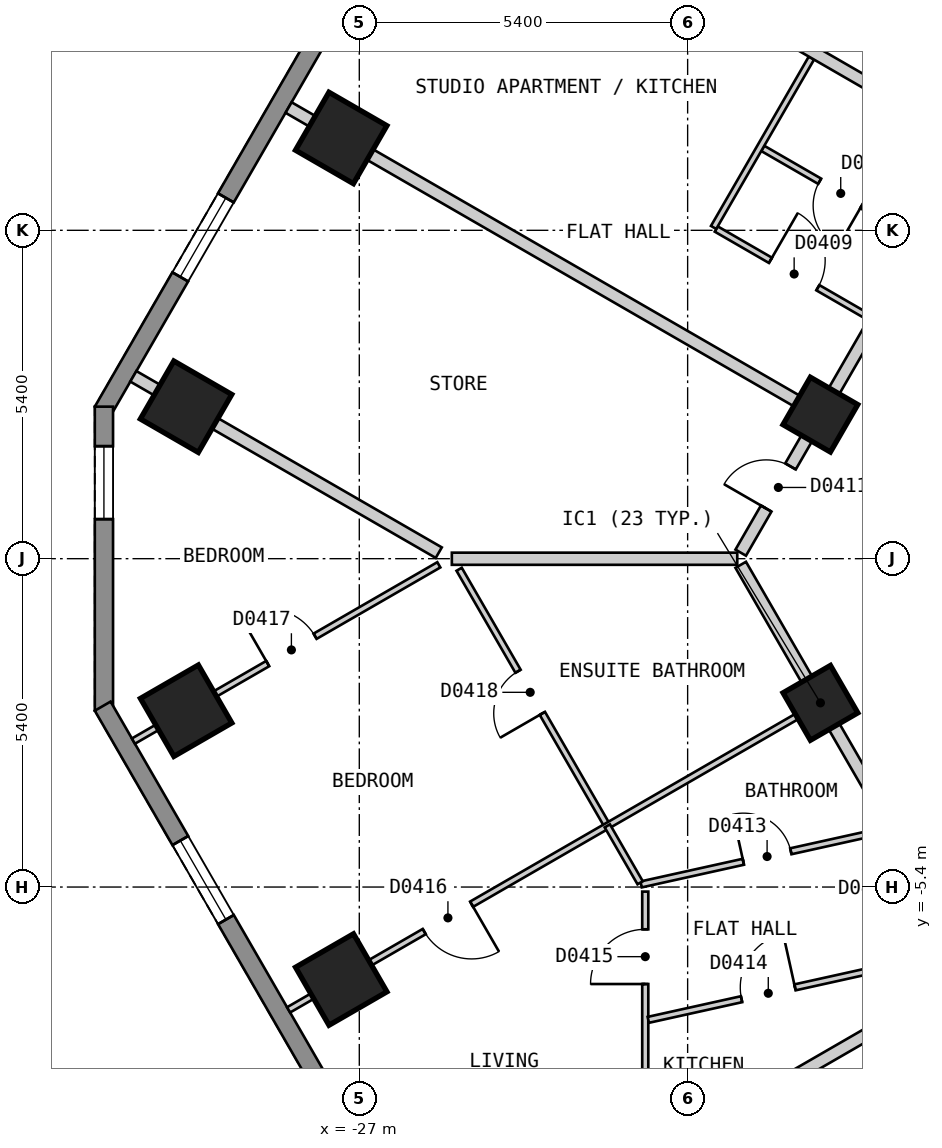
"""IFC4 building model, lengths in metres.
Left out: names, types, materials, properties, quantities, classifications, styles, units other than length and angle.
Written with IfcOpenShell. Run it as: python <this file> out.ifc"""

import sys

from ifc_helpers import new_model, si_unit, direction, frame, frame_2d, origin, origin_2d, place, context, subcontext, project, spatial, polyline, rectangle, outline, extrude, element, fill, save


model = new_model("IFC4")
c1 = context("Model", 3, precision=1e-05, world=origin(), true_north=direction((0.0, 1.0)))
c2 = subcontext(c1, "Body", "Model", "MODEL_VIEW")
j1 = project(units=[si_unit("LENGTHUNIT", "METRE"), si_unit("PLANEANGLEUNIT", "RADIAN")], contexts=[c1])
p1 = place(None, origin())
s1 = spatial("IfcSite", under=j1, at=p1, CompositionType="ELEMENT")
p2 = place(p1, origin())
s2 = spatial("IfcBuilding", under=s1, at=p2, CompositionType="ELEMENT")
p3 = place(p2, frame((0.0, 0.0, 26.4)))
s3 = spatial("IfcBuildingStorey", under=s2, at=p3, CompositionType="ELEMENT", Elevation=26.4)
for number, where, z_axis, x_axis in (
    (1, (-27.298, 6.919, 0.0), (0.0, 0.0, 1.0), (-0.5, -0.866, 0.0)),
    (2, (-29.849, 2.499, 0.0), (0.0, 0.0, 1.0), (-0.5, -0.866, 0.0)),
    (3, (-29.848, -2.5, 0.0), (0.0, 0.0, 1.0), (0.5, -0.866, 0.0)),
    (4, (-27.297, -6.921, 0.0), (0.0, 0.0, 1.0), (0.5, -0.866, 0.0)),
):
    element("IfcColumn", number, at=place(p3, frame(where, z_axis=z_axis, x_axis=x_axis)), inside=s3, PredefinedType="COLUMN", context=c2, shape_type="SweptSolid", body=[
        extrude(rectangle(XDim=1.1, YDim=1.1, at=origin_2d()), origin(), (0.0, 0.0, 1.0), 3.0),
    ])
for number, where, z_axis, x_axis in (
    (5, (-19.416, -2.371, 0.0), (0.0, 0.0, 1.0), (0.5, -0.866, 0.0)),
    (6, (-19.417, 2.369, 0.0), (0.0, 0.0, 1.0), (-0.5, -0.866, 0.0)),
):
    element("IfcColumn", number, at=place(p3, frame(where, z_axis=z_axis, x_axis=x_axis)), inside=s3, PredefinedType="COLUMN", context=c2, shape_type="SweptSolid", body=[
        extrude(rectangle(XDim=0.9, YDim=0.9, at=origin_2d()), origin(), (0.0, 0.0, 1.0), 3.0),
    ])
p4 = place(p3, frame((-17.71, 25.825, 0.0), z_axis=(0.0, 0.0, 1.0), x_axis=(-0.500001938803, -0.866024284413, 0.0)))
e7 = element("IfcWall", 7, at=p4, inside=s3, PredefinedType="SOLIDWALL", context=c2, shape_type="SweptSolid", body=[
    extrude(outline(polyline([(0.0, -0.15), (27.02, -0.15), (26.94, 0.15), (0.08, 0.15), (0.0, -0.15)])), origin(), (0.0, 0.0, 1.0), 2.7),
])
p5 = place(p4, frame((2.553, 0.0, 0.15)))
e8 = element("IfcOpeningElement", 8, at=p5, cuts=e7, PredefinedType="OPENING", context=c2, shape_type="SweptSolid", body=[
    extrude(rectangle(XDim=1.5, YDim=2.1, at=frame_2d((0.75, 1.05))), frame((0.0, 0.16, 0.0), z_axis=(0.0, -1.0, 0.0), x_axis=(1.0, 0.0, 0.0)), (0.0, 0.0, 1.0), 0.32),
])
p6 = place(p4, frame((7.658, 0.0, 0.15)))
e9 = element("IfcOpeningElement", 9, at=p6, cuts=e7, PredefinedType="OPENING", context=c2, shape_type="SweptSolid", body=[
    extrude(rectangle(XDim=1.5, YDim=2.1, at=frame_2d((0.75, 1.05))), frame((0.0, 0.16, 0.0), z_axis=(0.0, -1.0, 0.0), x_axis=(1.0, 0.0, 0.0)), (0.0, 0.0, 1.0), 0.32),
])
p7 = place(p4, frame((12.761, 0.0, 0.15)))
e10 = element("IfcOpeningElement", 10, at=p7, cuts=e7, PredefinedType="OPENING", context=c2, shape_type="SweptSolid", body=[
    extrude(rectangle(XDim=1.5, YDim=2.1, at=frame_2d((0.75, 1.05))), frame((0.0, 0.16, 0.0), z_axis=(0.0, -1.0, 0.0), x_axis=(1.0, 0.0, 0.0)), (0.0, 0.0, 1.0), 0.32),
])
p8 = place(p4, frame((17.865, 0.0, 0.15)))
e11 = element("IfcOpeningElement", 11, at=p8, cuts=e7, PredefinedType="OPENING", context=c2, shape_type="SweptSolid", body=[
    extrude(rectangle(XDim=1.5, YDim=2.1, at=frame_2d((0.75, 1.05))), frame((0.0, 0.16, 0.0), z_axis=(0.0, -1.0, 0.0), x_axis=(1.0, 0.0, 0.0)), (0.0, 0.0, 1.0), 0.32),
])
p9 = place(p4, frame((22.969, 0.0, 0.15)))
e12 = element("IfcOpeningElement", 12, at=p9, cuts=e7, PredefinedType="OPENING", context=c2, shape_type="SweptSolid", body=[
    extrude(rectangle(XDim=1.5, YDim=2.1, at=frame_2d((0.75, 1.05))), frame((0.0, 0.16, 0.0), z_axis=(0.0, -1.0, 0.0), x_axis=(1.0, 0.0, 0.0)), (0.0, 0.0, 1.0), 0.32),
])
p10 = place(p3, frame((-31.2, 2.5, 0.0), z_axis=(0.0, 0.0, 1.0), x_axis=(0.0, -1.0, 0.0)))
e13 = element("IfcWall", 13, at=p10, inside=s3, PredefinedType="SOLIDWALL", context=c2, shape_type="SweptSolid", body=[
    extrude(outline(polyline([(0.0, -0.15), (5.0, -0.15), (4.92, 0.15), (0.08, 0.15), (0.0, -0.15)])), origin(), (0.0, 0.0, 1.0), 2.7),
])
p11 = place(p10, frame((0.65, 0.0, 0.15)))
e14 = element("IfcOpeningElement", 14, at=p11, cuts=e13, PredefinedType="OPENING", context=c2, shape_type="SweptSolid", body=[
    extrude(rectangle(XDim=1.2, YDim=2.1, at=frame_2d((0.6, 1.05))), frame((0.0, 0.16, 0.0), z_axis=(0.0, -1.0, 0.0), x_axis=(1.0, 0.0, 0.0)), (0.0, 0.0, 1.0), 0.32),
])
p12 = place(p3, frame((-31.22, -2.425, 0.0), z_axis=(0.0, 0.0, 1.0), x_axis=(0.500001938803, -0.866024284413, 0.0)))
e15 = element("IfcWall", 15, at=p12, inside=s3, PredefinedType="SOLIDWALL", context=c2, shape_type="SweptSolid", body=[
    extrude(outline(polyline([(0.0, -0.15), (27.02, -0.15), (26.94, 0.15), (0.08, 0.15), (0.0, -0.15)])), origin(), (0.0, 0.0, 1.0), 2.7),
])
p13 = place(p12, frame((2.553, 0.0, 0.15)))
e16 = element("IfcOpeningElement", 16, at=p13, cuts=e15, PredefinedType="OPENING", context=c2, shape_type="SweptSolid", body=[
    extrude(rectangle(XDim=1.5, YDim=2.1, at=frame_2d((0.75, 1.05))), frame((0.0, 0.16, 0.0), z_axis=(0.0, -1.0, 0.0), x_axis=(1.0, 0.0, 0.0)), (0.0, 0.0, 1.0), 0.32),
])
p14 = place(p12, frame((7.657, 0.0, 0.15)))
e17 = element("IfcOpeningElement", 17, at=p14, cuts=e15, PredefinedType="OPENING", context=c2, shape_type="SweptSolid", body=[
    extrude(rectangle(XDim=1.5, YDim=2.1, at=frame_2d((0.75, 1.05))), frame((0.0, 0.16, 0.0), z_axis=(0.0, -1.0, 0.0), x_axis=(1.0, 0.0, 0.0)), (0.0, 0.0, 1.0), 0.32),
])
p15 = place(p12, frame((12.761, 0.0, 0.15)))
e18 = element("IfcOpeningElement", 18, at=p15, cuts=e15, PredefinedType="OPENING", context=c2, shape_type="SweptSolid", body=[
    extrude(rectangle(XDim=1.5, YDim=2.1, at=frame_2d((0.75, 1.05))), frame((0.0, 0.16, 0.0), z_axis=(0.0, -1.0, 0.0), x_axis=(1.0, 0.0, 0.0)), (0.0, 0.0, 1.0), 0.32),
])
p16 = place(p12, frame((17.865, 0.0, 0.15)))
e19 = element("IfcOpeningElement", 19, at=p16, cuts=e15, PredefinedType="OPENING", context=c2, shape_type="SweptSolid", body=[
    extrude(rectangle(XDim=1.5, YDim=2.1, at=frame_2d((0.75, 1.05))), frame((0.0, 0.16, 0.0), z_axis=(0.0, -1.0, 0.0), x_axis=(1.0, 0.0, 0.0)), (0.0, 0.0, 1.0), 0.32),
])
p17 = place(p12, frame((22.969, 0.0, 0.15)))
e20 = element("IfcOpeningElement", 20, at=p17, cuts=e15, PredefinedType="OPENING", context=c2, shape_type="SweptSolid", body=[
    extrude(rectangle(XDim=1.5, YDim=2.1, at=frame_2d((0.75, 1.05))), frame((0.0, 0.16, 0.0), z_axis=(0.0, -1.0, 0.0), x_axis=(1.0, 0.0, 0.0)), (0.0, 0.0, 1.0), 0.32),
])
p18 = place(p3, frame((-20.727, -0.101, 0.0), z_axis=(0.0, 0.0, 1.0), x_axis=(0.500049702773, -0.865996705973, 0.0)))
e21 = element("IfcWall", 21, at=p18, inside=s3, PredefinedType="PARTITIONING", context=c2, shape_type="SweptSolid", body=[
    extrude(rectangle(XDim=7.211, YDim=0.2, at=frame_2d((3.605, 0.0))), origin(), (0.0, 0.0, 1.0), 2.7),
])
p19 = place(p18, frame((5.654, 0.0, 0.0)))
e22 = element("IfcOpeningElement", 22, at=p19, cuts=e21, PredefinedType="OPENING", context=c2, shape_type="SweptSolid", body=[
    extrude(rectangle(XDim=1.0, YDim=2.1, at=frame_2d((0.5, 1.05))), frame((0.0, 0.11, 0.0), z_axis=(0.0, -1.0, 0.0), x_axis=(1.0, 0.0, 0.0)), (0.0, 0.0, 1.0), 0.22),
])
p20 = place(p3, frame((-20.727, 0.099, 0.0), z_axis=(0.0, 0.0, 1.0), x_axis=(0.499993204491, 0.866029327138, 0.0)))
e23 = element("IfcWall", 23, at=p20, inside=s3, PredefinedType="PARTITIONING", context=c2, shape_type="SweptSolid", body=[
    extrude(rectangle(XDim=20.554, YDim=0.2, at=frame_2d((10.277, 0.0))), origin(), (0.0, 0.0, 1.0), 2.7),
])
p21 = place(p20, frame((18.916, 0.0, 0.0)))
e24 = element("IfcOpeningElement", 24, at=p21, cuts=e23, PredefinedType="OPENING", context=c2, shape_type="SweptSolid", body=[
    extrude(rectangle(XDim=0.8, YDim=2.1, at=frame_2d((0.4, 1.05))), frame((0.0, 0.11, 0.0), z_axis=(0.0, -1.0, 0.0), x_axis=(1.0, 0.0, 0.0)), (0.0, 0.0, 1.0), 0.22),
])
p22 = place(p20, frame((14.88, 0.0, 0.0)))
e25 = element("IfcOpeningElement", 25, at=p22, cuts=e23, PredefinedType="OPENING", context=c2, shape_type="SweptSolid", body=[
    extrude(rectangle(XDim=1.0, YDim=2.1, at=frame_2d((0.5, 1.05))), frame((0.0, 0.11, 0.0), z_axis=(0.0, -1.0, 0.0), x_axis=(1.0, 0.0, 0.0)), (0.0, 0.0, 1.0), 0.22),
])
p23 = place(p20, frame((9.776, 0.0, 0.0)))
e26 = element("IfcOpeningElement", 26, at=p23, cuts=e23, PredefinedType="OPENING", context=c2, shape_type="SweptSolid", body=[
    extrude(rectangle(XDim=1.0, YDim=2.1, at=frame_2d((0.5, 1.05))), frame((0.0, 0.11, 0.0), z_axis=(0.0, -1.0, 0.0), x_axis=(1.0, 0.0, 0.0)), (0.0, 0.0, 1.0), 0.22),
])
p24 = place(p20, frame((4.673, 0.0, 0.0)))
e27 = element("IfcOpeningElement", 27, at=p24, cuts=e23, PredefinedType="OPENING", context=c2, shape_type="SweptSolid", body=[
    extrude(rectangle(XDim=1.0, YDim=2.1, at=frame_2d((0.5, 1.05))), frame((0.0, 0.11, 0.0), z_axis=(0.0, -1.0, 0.0), x_axis=(1.0, 0.0, 0.0)), (0.0, 0.0, 1.0), 0.22),
])
p25 = place(p20, frame((0.838, 0.0, 0.0)))
e28 = element("IfcOpeningElement", 28, at=p25, cuts=e23, PredefinedType="OPENING", context=c2, shape_type="SweptSolid", body=[
    extrude(rectangle(XDim=0.8, YDim=2.1, at=frame_2d((0.4, 1.05))), frame((0.0, 0.11, 0.0), z_axis=(0.0, -1.0, 0.0), x_axis=(1.0, 0.0, 0.0)), (0.0, 0.0, 1.0), 0.22),
])
p26 = place(p3, frame((-25.358, -0.174, 0.0), z_axis=(0.0, 0.0, 1.0), x_axis=(0.500093956194, -0.865971151354, 0.0)))
e29 = element("IfcWall", 29, at=p26, inside=s3, PredefinedType="PARTITIONING", context=c2, shape_type="SweptSolid", body=[
    extrude(rectangle(XDim=4.873, YDim=0.1, at=frame_2d((2.437, 0.0))), origin(), (0.0, 0.0, 1.0), 2.7),
])
p27 = place(p26, frame((1.937, 0.0, 0.0)))
e30 = element("IfcOpeningElement", 30, at=p27, cuts=e29, PredefinedType="OPENING", context=c2, shape_type="SweptSolid", body=[
    extrude(rectangle(XDim=0.8, YDim=2.1, at=frame_2d((0.4, 1.05))), frame((0.0, 0.06, 0.0), z_axis=(0.0, -1.0, 0.0), x_axis=(1.0, 0.0, 0.0)), (0.0, 0.0, 1.0), 0.12),
])
p28 = place(p3, frame((-20.364, 6.747, 0.0), z_axis=(0.0, 0.0, 1.0), x_axis=(0.866003949776, -0.500037157592, 0.0)))
e31 = element("IfcWall", 31, at=p28, inside=s3, PredefinedType="PARTITIONING", context=c2, shape_type="SweptSolid", body=[
    extrude(rectangle(XDim=2.91, YDim=0.1, at=frame_2d((1.455, 0.0))), origin(), (0.0, 0.0, 1.0), 2.7),
])
p29 = place(p28, frame((1.08, 0.0, 0.0)))
e32 = element("IfcOpeningElement", 32, at=p29, cuts=e31, PredefinedType="OPENING", context=c2, shape_type="SweptSolid", body=[
    extrude(rectangle(XDim=0.8, YDim=2.1, at=frame_2d((0.4, 1.05))), frame((0.0, 0.06, 0.0), z_axis=(0.0, -1.0, 0.0), x_axis=(1.0, 0.0, 0.0)), (0.0, 0.0, 1.0), 0.12),
])
p30 = place(p3, frame((-21.129, 5.421, 0.0), z_axis=(0.0, 0.0, 1.0), x_axis=(0.865935355752, -0.500155935342, 0.0)))
e33 = element("IfcWall", 33, at=p30, inside=s3, PredefinedType="PARTITIONING", context=c2, shape_type="SweptSolid", body=[
    extrude(rectangle(XDim=2.909, YDim=0.1, at=frame_2d((1.454, 0.0))), origin(), (0.0, 0.0, 1.0), 2.7),
])
p31 = place(p30, frame((1.029, 0.0, 0.0)))
e34 = element("IfcOpeningElement", 34, at=p31, cuts=e33, PredefinedType="OPENING", context=c2, shape_type="SweptSolid", body=[
    extrude(rectangle(XDim=0.9, YDim=2.1, at=frame_2d((0.45, 1.05))), frame((0.0, 0.06, 0.0), z_axis=(0.0, -1.0, 0.0), x_axis=(1.0, 0.0, 0.0)), (0.0, 0.0, 1.0), 0.12),
])
p32 = place(p3, frame((-21.173, 5.447, 0.0), z_axis=(0.0, 0.0, 1.0), x_axis=(0.500162542782, 0.865931539325, 0.0)))
e35 = element("IfcWall", 35, at=p32, inside=s3, PredefinedType="PARTITIONING", context=c2, shape_type="SweptSolid", body=[
    extrude(rectangle(XDim=3.217, YDim=0.1, at=frame_2d((1.609, 0.0))), origin(), (0.0, 0.0, 1.0), 2.7),
])
p33 = place(p3, frame((-22.297, -9.813, 0.0), z_axis=(0.0, 0.0, 1.0), x_axis=(0.0, 1.0, 0.0)))
e36 = element("IfcWall", 36, at=p33, inside=s3, PredefinedType="PARTITIONING", context=c2, shape_type="SweptSolid", body=[
    extrude(rectangle(XDim=4.338, YDim=0.1, at=frame_2d((2.169, 0.0))), origin(), (0.0, 0.0, 1.0), 2.7),
])
p34 = place(p33, frame((2.818, 0.0, 0.0)))
e37 = element("IfcOpeningElement", 37, at=p34, cuts=e36, PredefinedType="OPENING", context=c2, shape_type="SweptSolid", body=[
    extrude(rectangle(XDim=0.9, YDim=2.1, at=frame_2d((0.45, 1.05))), frame((0.0, 0.06, 0.0), z_axis=(0.0, -1.0, 0.0), x_axis=(1.0, 0.0, 0.0)), (0.0, 0.0, 1.0), 0.12),
])
p35 = place(p3, frame((-22.365, -5.357, 0.0), z_axis=(0.0, 0.0, 1.0), x_axis=(0.976339488582, 0.216243388421, 0.0)))
e38 = element("IfcWall", 38, at=p35, inside=s3, PredefinedType="PARTITIONING", context=c2, shape_type="SweptSolid", body=[
    extrude(rectangle(XDim=4.139, YDim=0.1, at=frame_2d((2.069, 0.0))), origin(), (0.0, 0.0, 1.0), 2.7),
])
p36 = place(p35, frame((1.722, 0.0, 0.0)))
e39 = element("IfcOpeningElement", 39, at=p36, cuts=e38, PredefinedType="OPENING", context=c2, shape_type="SweptSolid", body=[
    extrude(rectangle(XDim=0.8, YDim=2.1, at=frame_2d((0.4, 1.05))), frame((0.0, 0.06, 0.0), z_axis=(0.0, -1.0, 0.0), x_axis=(1.0, 0.0, 0.0)), (0.0, 0.0, 1.0), 0.12),
])
p37 = place(p3, frame((-22.247, -7.584, 0.0), z_axis=(0.0, 0.0, 1.0), x_axis=(0.97635375062, 0.216178985219, 0.0)))
e40 = element("IfcWall", 40, at=p37, inside=s3, PredefinedType="PARTITIONING", context=c2, shape_type="SweptSolid", body=[
    extrude(rectangle(XDim=4.094, YDim=0.1, at=frame_2d((2.047, 0.0))), origin(), (0.0, 0.0, 1.0), 2.7),
])
p38 = place(p37, frame((1.571, 0.0, 0.0)))
e41 = element("IfcOpeningElement", 41, at=p38, cuts=e40, PredefinedType="OPENING", context=c2, shape_type="SweptSolid", body=[
    extrude(rectangle(XDim=0.9, YDim=2.1, at=frame_2d((0.45, 1.05))), frame((0.0, 0.06, 0.0), z_axis=(0.0, -1.0, 0.0), x_axis=(1.0, 0.0, 0.0)), (0.0, 0.0, 1.0), 0.12),
])
p39 = place(p3, frame((-28.163, -7.42, 0.0), z_axis=(0.0, 0.0, 1.0), x_axis=(0.866065245018, 0.499930986609, 0.0)))
e42 = element("IfcWall", 42, at=p39, inside=s3, PredefinedType="PARTITIONING", context=c2, shape_type="SweptSolid", body=[
    extrude(rectangle(XDim=10.0, YDim=0.1, at=frame_2d((5.0, 0.0))), origin(), (0.0, 0.0, 1.0), 2.7),
])
p40 = place(p39, frame((2.576, 0.0, 0.0)))
e43 = element("IfcOpeningElement", 43, at=p40, cuts=e42, PredefinedType="OPENING", context=c2, shape_type="SweptSolid", body=[
    extrude(rectangle(XDim=0.9, YDim=2.1, at=frame_2d((0.45, 1.05))), frame((0.0, 0.06, 0.0), z_axis=(0.0, -1.0, 0.0), x_axis=(1.0, 0.0, 0.0)), (0.0, 0.0, 1.0), 0.12),
])
p41 = place(p3, frame((-30.715, -3.0, 0.0), z_axis=(0.0, 0.0, 1.0), x_axis=(0.866116197112, 0.49984270836, 0.0)))
e44 = element("IfcWall", 44, at=p41, inside=s3, PredefinedType="PARTITIONING", context=c2, shape_type="SweptSolid", body=[
    extrude(rectangle(XDim=5.8, YDim=0.1, at=frame_2d((2.9, 0.0))), origin(), (0.0, 0.0, 1.0), 2.7),
])
p42 = place(p41, frame((2.55, 0.0, 0.0)))
e45 = element("IfcOpeningElement", 45, at=p42, cuts=e44, PredefinedType="OPENING", context=c2, shape_type="SweptSolid", body=[
    extrude(rectangle(XDim=0.9, YDim=2.1, at=frame_2d((0.45, 1.05))), frame((0.0, 0.06, 0.0), z_axis=(0.0, -1.0, 0.0), x_axis=(1.0, 0.0, 0.0)), (0.0, 0.0, 1.0), 0.12),
])
p43 = place(p3, frame((-28.163, 7.419, 0.0), z_axis=(0.0, 0.0, 1.0), x_axis=(0.866022959057, -0.500004234368, 0.0)))
e46 = element("IfcWall", 46, at=p43, inside=s3, PredefinedType="PARTITIONING", context=c2, shape_type="SweptSolid", body=[
    extrude(rectangle(XDim=10.0, YDim=0.2, at=frame_2d((5.0, 0.0))), origin(), (0.0, 0.0, 1.0), 2.7),
])
p44 = place(p3, frame((-30.716, 2.999, 0.0), z_axis=(0.0, 0.0, 1.0), x_axis=(0.866032775405, -0.499987231761, 0.0)))
e47 = element("IfcWall", 47, at=p44, inside=s3, PredefinedType="PARTITIONING", context=c2, shape_type="SweptSolid", body=[
    extrude(rectangle(XDim=5.8, YDim=0.2, at=frame_2d((2.9, 0.0))), origin(), (0.0, 0.0, 1.0), 2.7),
])
p45 = place(p3, frame((-25.611, 11.839, 0.0), z_axis=(0.0, 0.0, 1.0), x_axis=(0.866022959057, -0.500004234368, 0.0)))
e48 = element("IfcWall", 48, at=p45, inside=s3, PredefinedType="PARTITIONING", context=c2, shape_type="SweptSolid", body=[
    extrude(rectangle(XDim=10.0, YDim=0.2, at=frame_2d((5.0, 0.0))), origin(), (0.0, 0.0, 1.0), 2.7),
])
p46 = place(p3, frame((-25.478, -0.001, 0.0), z_axis=(0.0, 0.0, 1.0), x_axis=(1.0, 0.0, 0.0)))
e49 = element("IfcWall", 49, at=p46, inside=s3, PredefinedType="PARTITIONING", context=c2, shape_type="SweptSolid", body=[
    extrude(rectangle(XDim=4.694, YDim=0.2, at=frame_2d((2.347, 0.0))), origin(), (0.0, 0.0, 1.0), 2.7),
])
p47 = place(p3, frame((-25.61, -11.841, 0.0), z_axis=(0.0, 0.0, 1.0), x_axis=(0.866019023803, 0.500011050288, 0.0)))
e50 = element("IfcWall", 50, at=p47, inside=s3, PredefinedType="PARTITIONING", context=c2, shape_type="SweptSolid", body=[
    extrude(rectangle(XDim=8.47, YDim=0.2, at=frame_2d((4.235, 0.0))), origin(), (0.0, 0.0, 1.0), 2.7),
])
p48 = place(p3, frame((-22.921, -4.394, 0.0), z_axis=(0.0, 0.0, 1.0), x_axis=(0.499565963512, -0.866275849889, 0.0)))
e51 = element("IfcWall", 51, at=p48, inside=s3, PredefinedType="PARTITIONING", context=c2, shape_type="SweptSolid", body=[
    extrude(rectangle(XDim=1.081, YDim=0.1, at=frame_2d((0.54, 0.0))), origin(), (0.0, 0.0, 1.0), 2.7),
])
p49 = place(p9, origin())
e52 = element("IfcWindow", 52, at=p49, inside=s3, PartitioningType="SINGLE_PANEL", PredefinedType="WINDOW", context=c2, shape_type="SweptSolid", body=[
    extrude(rectangle(XDim=1.5, YDim=2.1, at=frame_2d((0.75, 1.05))), frame((0.0, 0.03, 0.0), z_axis=(0.0, -1.0, 0.0), x_axis=(1.0, 0.0, 0.0)), (0.0, 0.0, 1.0), 0.06),
])
fill(e12, e52)
p50 = place(p11, origin())
e53 = element("IfcWindow", 53, at=p50, inside=s3, PartitioningType="SINGLE_PANEL", PredefinedType="WINDOW", context=c2, shape_type="SweptSolid", body=[
    extrude(rectangle(XDim=1.2, YDim=2.1, at=frame_2d((0.6, 1.05))), frame((0.0, 0.03, 0.0), z_axis=(0.0, -1.0, 0.0), x_axis=(1.0, 0.0, 0.0)), (0.0, 0.0, 1.0), 0.06),
])
fill(e14, e53)
p51 = place(p13, origin())
e54 = element("IfcWindow", 54, at=p51, inside=s3, PartitioningType="SINGLE_PANEL", PredefinedType="WINDOW", context=c2, shape_type="SweptSolid", body=[
    extrude(rectangle(XDim=1.5, YDim=2.1, at=frame_2d((0.75, 1.05))), frame((0.0, 0.03, 0.0), z_axis=(0.0, -1.0, 0.0), x_axis=(1.0, 0.0, 0.0)), (0.0, 0.0, 1.0), 0.06),
])
fill(e16, e54)
p52 = place(p31, origin())
e55 = element("IfcDoor", 55, at=p52, inside=s3, OperationType="SINGLE_SWING_LEFT", PredefinedType="DOOR", context=c2, shape_type="SweptSolid", body=[
    extrude(rectangle(XDim=0.9, YDim=2.1, at=frame_2d((0.45, 1.05))), frame((0.0, 0.025, 0.0), z_axis=(0.0, -1.0, 0.0), x_axis=(1.0, 0.0, 0.0)), (0.0, 0.0, 1.0), 0.05),
])
fill(e34, e55)
p53 = place(p29, origin())
e56 = element("IfcDoor", 56, at=p53, inside=s3, OperationType="SINGLE_SWING_RIGHT", PredefinedType="DOOR", context=c2, shape_type="SweptSolid", body=[
    extrude(rectangle(XDim=0.8, YDim=2.1, at=frame_2d((0.4, 1.05))), frame((0.0, 0.025, 0.0), z_axis=(0.0, -1.0, 0.0), x_axis=(1.0, 0.0, 0.0)), (0.0, 0.0, 1.0), 0.05),
])
fill(e32, e56)
p54 = place(p25, origin())
e57 = element("IfcDoor", 57, at=p54, inside=s3, OperationType="SINGLE_SWING_LEFT", PredefinedType="DOOR", context=c2, shape_type="SweptSolid", body=[
    extrude(rectangle(XDim=0.8, YDim=2.1, at=frame_2d((0.4, 1.05))), frame((0.0, 0.025, 0.0), z_axis=(0.0, -1.0, 0.0), x_axis=(1.0, 0.0, 0.0)), (0.0, 0.0, 1.0), 0.05),
])
fill(e28, e57)
p55 = place(p36, origin())
e58 = element("IfcDoor", 58, at=p55, inside=s3, OperationType="SINGLE_SWING_LEFT", PredefinedType="DOOR", context=c2, shape_type="SweptSolid", body=[
    extrude(rectangle(XDim=0.8, YDim=2.1, at=frame_2d((0.4, 1.05))), frame((0.0, 0.025, 0.0), z_axis=(0.0, -1.0, 0.0), x_axis=(1.0, 0.0, 0.0)), (0.0, 0.0, 1.0), 0.05),
])
fill(e39, e58)
p56 = place(p38, origin())
e59 = element("IfcDoor", 59, at=p56, inside=s3, OperationType="SINGLE_SWING_RIGHT", PredefinedType="DOOR", context=c2, shape_type="SweptSolid", body=[
    extrude(rectangle(XDim=0.9, YDim=2.1, at=frame_2d((0.45, 1.05))), frame((0.0, 0.025, 0.0), z_axis=(0.0, -1.0, 0.0), x_axis=(1.0, 0.0, 0.0)), (0.0, 0.0, 1.0), 0.05),
])
fill(e41, e59)
p57 = place(p34, origin())
e60 = element("IfcDoor", 60, at=p57, inside=s3, OperationType="SINGLE_SWING_LEFT", PredefinedType="DOOR", context=c2, shape_type="SweptSolid", body=[
    extrude(rectangle(XDim=0.9, YDim=2.1, at=frame_2d((0.45, 1.05))), frame((0.0, 0.025, 0.0), z_axis=(0.0, -1.0, 0.0), x_axis=(1.0, 0.0, 0.0)), (0.0, 0.0, 1.0), 0.05),
])
fill(e37, e60)
p58 = place(p40, origin())
e61 = element("IfcDoor", 61, at=p58, inside=s3, OperationType="SINGLE_SWING_RIGHT", PredefinedType="DOOR", context=c2, shape_type="SweptSolid", body=[
    extrude(rectangle(XDim=0.9, YDim=2.1, at=frame_2d((0.45, 1.05))), frame((0.0, 0.025, 0.0), z_axis=(0.0, -1.0, 0.0), x_axis=(1.0, 0.0, 0.0)), (0.0, 0.0, 1.0), 0.05),
])
fill(e43, e61)
p59 = place(p42, origin())
e62 = element("IfcDoor", 62, at=p59, inside=s3, OperationType="SINGLE_SWING_LEFT", PredefinedType="DOOR", context=c2, shape_type="SweptSolid", body=[
    extrude(rectangle(XDim=0.9, YDim=2.1, at=frame_2d((0.45, 1.05))), frame((0.0, 0.025, 0.0), z_axis=(0.0, -1.0, 0.0), x_axis=(1.0, 0.0, 0.0)), (0.0, 0.0, 1.0), 0.05),
])
fill(e45, e62)
p60 = place(p27, origin())
e63 = element("IfcDoor", 63, at=p60, inside=s3, OperationType="SINGLE_SWING_RIGHT", PredefinedType="DOOR", context=c2, shape_type="SweptSolid", body=[
    extrude(rectangle(XDim=0.8, YDim=2.1, at=frame_2d((0.4, 1.05))), frame((0.0, 0.025, 0.0), z_axis=(0.0, -1.0, 0.0), x_axis=(1.0, 0.0, 0.0)), (0.0, 0.0, 1.0), 0.05),
])
fill(e30, e63)
save(model, sys.argv[1])
